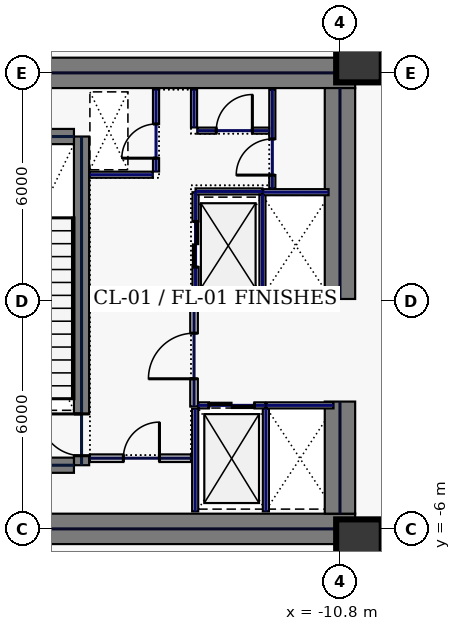
"""IFC4 building model, lengths in metres.
Left out: names, types, materials, properties, quantities, classifications, styles, units other than length and angle.
Written with IfcOpenShell. Run it as: python <this file> out.ifc"""

import sys

from ifc_helpers import new_model, si_unit, direction, frame, frame_2d, origin, origin_2d, place, context, subcontext, project, spatial, rectangle, hollow_rectangle, extrude, element, fill, save


model = new_model("IFC4")
c1 = context("Model", 3, precision=1e-05, world=origin(), true_north=direction((0.0, 1.0)))
c2 = subcontext(c1, "Body", "Model", "MODEL_VIEW")
j1 = project(units=[si_unit("LENGTHUNIT", "METRE"), si_unit("PLANEANGLEUNIT", "RADIAN")], contexts=[c1])
p1 = place(None, origin())
s1 = spatial("IfcSite", under=j1, at=p1, CompositionType="ELEMENT")
p2 = place(p1, origin())
s2 = spatial("IfcBuilding", under=s1, at=p2, CompositionType="ELEMENT")
p3 = place(p2, frame((0.0, 0.0, 28.4)))
s3 = spatial("IfcBuildingStorey", under=s2, at=p3, CompositionType="ELEMENT", Elevation=28.4)
for number, where, z_axis, x_axis in (
    (1, (-22.0, 6.0, 0.0), (0.0, 0.0, 1.0), (1.0, 0.0, 0.0)),
    (2, (-22.0, -6.0, 0.0), (0.0, 0.0, 1.0), (1.0, 0.0, 0.0)),
):
    element("IfcWall", number, at=place(p3, frame(where, z_axis=z_axis, x_axis=x_axis)), inside=s3, PredefinedType="SHEAR", context=c2, shape_type="SweptSolid", body=[
        extrude(rectangle(XDim=11.6, YDim=0.8, at=frame_2d((5.8, 0.0))), origin(), (0.0, 0.0, 1.0), 4.68),
    ])
p4 = place(p3, frame((-10.8, -5.6, 0.0), z_axis=(0.0, 0.0, 1.0), x_axis=(0.0, 1.0, 0.0)))
e3 = element("IfcWall", 3, at=p4, inside=s3, PredefinedType="SHEAR", context=c2, shape_type="SweptSolid", body=[
    extrude(rectangle(XDim=2.95, YDim=0.8, at=frame_2d((1.475, 0.0))), origin(), (0.0, 0.0, 1.0), 4.68),
])
p5 = place(p3, frame((-10.8, 0.05, 0.0), z_axis=(0.0, 0.0, 1.0), x_axis=(0.0, 1.0, 0.0)))
e4 = element("IfcWall", 4, at=p5, inside=s3, PredefinedType="SHEAR", context=c2, shape_type="SweptSolid", body=[
    extrude(rectangle(XDim=5.55, YDim=0.8, at=frame_2d((2.775, 0.0))), origin(), (0.0, 0.0, 1.0), 4.68),
])
p6 = place(p3, frame((-17.6, -4.325, 0.0), z_axis=(0.0, 0.0, 1.0), x_axis=(0.0, 1.0, 0.0)))
e5 = element("IfcWall", 5, at=p6, inside=s3, PredefinedType="SHEAR", context=c2, shape_type="SweptSolid", body=[
    extrude(rectangle(XDim=8.65, YDim=0.4, at=frame_2d((4.325, 0.0))), origin(), (0.0, 0.0, 1.0), 4.68),
])
p7 = place(p6, frame((0.25, 0.0, 0.0)))
e6 = element("IfcOpeningElement", 6, at=p7, cuts=e5, PredefinedType="OPENING", context=c2, shape_type="SweptSolid", body=[
    extrude(rectangle(XDim=1.1, YDim=2.2, at=frame_2d((0.55, 1.1))), frame((0.0, 0.21, 0.0), z_axis=(0.0, -1.0, 0.0), x_axis=(1.0, 0.0, 0.0)), (0.0, 0.0, 1.0), 0.42),
])
for number, where, z_axis, x_axis in (
    (7, (-21.2, -4.325, 0.0), (0.0, 0.0, 1.0), (1.0, 0.0, 0.0)),
    (8, (-21.2, 4.325, 0.0), (0.0, 0.0, 1.0), (1.0, 0.0, 0.0)),
):
    element("IfcWall", number, at=place(p3, frame(where, z_axis=z_axis, x_axis=x_axis)), inside=s3, PredefinedType="SHEAR", context=c2, shape_type="SweptSolid", body=[
        extrude(rectangle(XDim=3.4, YDim=0.4, at=frame_2d((1.7, 0.0))), origin(), (0.0, 0.0, 1.0), 4.68),
    ])
for number, where, z_axis, x_axis in (
    (9, (-10.3, -6.35, 0.0), (0.0, 0.0, 1.0), (1.0, 0.0, 0.0)),
    (10, (-10.3, 6.35, 0.0), (0.0, 0.0, 1.0), (1.0, 0.0, 0.0)),
):
    element("IfcColumn", number, at=place(p3, frame(where, z_axis=z_axis, x_axis=x_axis)), inside=s3, PredefinedType="COLUMN", context=c2, shape_type="SweptSolid", body=[
        extrude(hollow_rectangle(XDim=1.2, YDim=1.2, WallThickness=0.05, at=origin_2d()), origin(), (0.0, 0.0, 1.0), 4.68),
    ])
p8 = place(p3, frame((-14.6, 0.12, 0.0), z_axis=(0.0, 0.0, 1.0), x_axis=(0.0, 1.0, 0.0)))
e11 = element("IfcWall", 11, at=p8, inside=s3, PredefinedType="PARTITIONING", context=c2, shape_type="SweptSolid", body=[
    extrude(rectangle(XDim=2.74, YDim=0.16, at=frame_2d((1.37, 0.0))), origin(), (0.0, 0.0, 1.0), 4.68),
])
p9 = place(p8, frame((0.77, 0.0, 0.0)))
e12 = element("IfcOpeningElement", 12, at=p9, cuts=e11, PredefinedType="OPENING", context=c2, shape_type="SweptSolid", body=[
    extrude(rectangle(XDim=1.2, YDim=2.2, at=frame_2d((0.6, 1.1))), frame((0.0, 0.09, 0.0), z_axis=(0.0, -1.0, 0.0), x_axis=(1.0, 0.0, 0.0)), (0.0, 0.0, 1.0), 0.18),
])
for number, where, z_axis, x_axis in (
    (13, (-14.6, 0.1, 0.0), (0.0, 0.0, 1.0), (1.0, 0.0, 0.0)),
    (14, (-14.6, 2.88, 0.0), (0.0, 0.0, 1.0), (1.0, 0.0, 0.0)),
):
    element("IfcWall", number, at=place(p3, frame(where, z_axis=z_axis, x_axis=x_axis)), inside=s3, PredefinedType="PARTITIONING", context=c2, shape_type="SweptSolid", body=[
        extrude(rectangle(XDim=1.76, YDim=0.16, at=frame_2d((0.88, 0.0))), origin(), (0.0, 0.0, 1.0), 4.68),
    ])
p10 = place(p3, frame((-12.84, 0.18, 0.0), z_axis=(0.0, 0.0, 1.0), x_axis=(0.0, 1.0, 0.0)))
e15 = element("IfcWall", 15, at=p10, inside=s3, PredefinedType="PARTITIONING", context=c2, shape_type="SweptSolid", body=[
    extrude(rectangle(XDim=2.62, YDim=0.16, at=frame_2d((1.31, 0.0))), origin(), (0.0, 0.0, 1.0), 4.68),
])
p11 = place(p3, frame((-14.53, -2.75, 0.0), z_axis=(0.0, 0.0, 1.0), x_axis=(1.0, 0.0, 0.0)))
e16 = element("IfcWall", 16, at=p11, inside=s3, PredefinedType="PARTITIONING", context=c2, shape_type="SweptSolid", body=[
    extrude(rectangle(XDim=1.76, YDim=0.16, at=frame_2d((0.88, 0.0))), origin(), (0.0, 0.0, 1.0), 4.68),
])
p12 = place(p11, frame((0.28, 0.0, 0.0)))
e17 = element("IfcOpeningElement", 17, at=p12, cuts=e16, PredefinedType="OPENING", context=c2, shape_type="SweptSolid", body=[
    extrude(rectangle(XDim=1.2, YDim=2.2, at=frame_2d((0.6, 1.1))), frame((0.0, 0.09, 0.0), z_axis=(0.0, -1.0, 0.0), x_axis=(1.0, 0.0, 0.0)), (0.0, 0.0, 1.0), 0.18),
])
for number, where, z_axis, x_axis in (
    (18, (-12.75, -5.54, 0.0), (0.0, 0.0, 1.0), (0.0, 1.0, 0.0)),
    (19, (-14.61, -5.54, 0.0), (0.0, 0.0, 1.0), (0.0, 1.0, 0.0)),
):
    element("IfcWall", number, at=place(p3, frame(where, z_axis=z_axis, x_axis=x_axis)), inside=s3, PredefinedType="PARTITIONING", context=c2, shape_type="SweptSolid", body=[
        extrude(rectangle(XDim=2.7, YDim=0.16, at=frame_2d((1.35, 0.0))), origin(), (0.0, 0.0, 1.0), 4.68),
    ])
p13 = place(p3, frame((-12.73, -2.75, 0.0), z_axis=(0.0, 0.0, 1.0), x_axis=(1.0, 0.0, 0.0)))
e20 = element("IfcWall", 20, at=p13, inside=s3, PredefinedType="PARTITIONING", context=c2, shape_type="SweptSolid", body=[
    extrude(rectangle(XDim=1.76, YDim=0.16, at=frame_2d((0.88, 0.0))), origin(), (0.0, 0.0, 1.0), 4.68),
])
for number, where, z_axis, x_axis in (
    (21, (-12.82, 0.06, 0.0), (0.0, 0.0, 1.0), (1.0, 0.0, 0.0)),
    (22, (-12.82, 2.86, 0.0), (0.0, 0.0, 1.0), (1.0, 0.0, 0.0)),
):
    element("IfcWall", number, at=place(p3, frame(where, z_axis=z_axis, x_axis=x_axis)), inside=s3, PredefinedType="PARTITIONING", context=c2, shape_type="SweptSolid", body=[
        extrude(rectangle(XDim=1.72, YDim=0.16, at=frame_2d((0.86, 0.0))), origin(), (0.0, 0.0, 1.0), 4.68),
    ])
p14 = place(p3, frame((-15.64, 3.405, 0.0), z_axis=(0.0, 0.0, 1.0), x_axis=(0.0, 1.0, 0.0)))
e23 = element("IfcWall", 23, at=p14, inside=s3, PredefinedType="PARTITIONING", context=c2, shape_type="SweptSolid", body=[
    extrude(rectangle(XDim=2.155, YDim=0.16, at=frame_2d((1.078, 0.0))), origin(), (0.0, 0.0, 1.0), 4.68),
])
p15 = place(p14, frame((0.35, 0.0, 0.0)))
e24 = element("IfcOpeningElement", 24, at=p15, cuts=e23, PredefinedType="OPENING", context=c2, shape_type="SweptSolid", body=[
    extrude(rectangle(XDim=0.9, YDim=2.2, at=frame_2d((0.45, 1.1))), frame((0.0, 0.09, 0.0), z_axis=(0.0, -1.0, 0.0), x_axis=(1.0, 0.0, 0.0)), (0.0, 0.0, 1.0), 0.18),
])
p16 = place(p3, frame((-17.38, 3.32, 0.0), z_axis=(0.0, 0.0, 1.0), x_axis=(1.0, 0.0, 0.0)))
e25 = element("IfcWall", 25, at=p16, inside=s3, PredefinedType="PARTITIONING", context=c2, shape_type="SweptSolid", body=[
    extrude(rectangle(XDim=1.655, YDim=0.16, at=frame_2d((0.827, 0.0))), origin(), (0.0, 0.0, 1.0), 4.68),
])
p17 = place(p3, frame((-17.38, -4.14, 0.0), z_axis=(0.0, 0.0, 1.0), x_axis=(1.0, 0.0, 0.0)))
e26 = element("IfcWall", 26, at=p17, inside=s3, PredefinedType="SOLIDWALL", context=c2, shape_type="SweptSolid", body=[
    extrude(rectangle(XDim=2.66, YDim=0.2, at=frame_2d((1.33, 0.0))), origin(), (0.0, 0.0, 1.0), 4.68),
])
p18 = place(p17, frame((0.88, 0.0, 0.0)))
e27 = element("IfcOpeningElement", 27, at=p18, cuts=e26, PredefinedType="OPENING", context=c2, shape_type="SweptSolid", body=[
    extrude(rectangle(XDim=0.95, YDim=2.2, at=frame_2d((0.475, 1.1))), frame((0.0, 0.11, 0.0), z_axis=(0.0, -1.0, 0.0), x_axis=(1.0, 0.0, 0.0)), (0.0, 0.0, 1.0), 0.22),
])
p19 = place(p3, frame((-12.58, 2.96, 0.0), z_axis=(0.0, 0.0, 1.0), x_axis=(0.0, 1.0, 0.0)))
e28 = element("IfcWall", 28, at=p19, inside=s3, PredefinedType="PARTITIONING", context=c2, shape_type="SweptSolid", body=[
    extrude(rectangle(XDim=2.6, YDim=0.16, at=frame_2d((1.3, 0.0))), origin(), (0.0, 0.0, 1.0), 4.68),
])
p20 = place(p19, frame((0.35, 0.0, 0.0)))
e29 = element("IfcOpeningElement", 29, at=p20, cuts=e28, PredefinedType="OPENING", context=c2, shape_type="SweptSolid", body=[
    extrude(rectangle(XDim=0.95, YDim=2.2, at=frame_2d((0.475, 1.1))), frame((0.0, 0.09, 0.0), z_axis=(0.0, -1.0, 0.0), x_axis=(1.0, 0.0, 0.0)), (0.0, 0.0, 1.0), 0.18),
])
p21 = place(p3, frame((-14.555, 4.48, 0.0), z_axis=(0.0, 0.0, 1.0), x_axis=(1.0, 0.0, 0.0)))
e30 = element("IfcWall", 30, at=p21, inside=s3, PredefinedType="PARTITIONING", context=c2, shape_type="SweptSolid", body=[
    extrude(rectangle(XDim=1.89, YDim=0.16, at=frame_2d((0.945, 0.0))), origin(), (0.0, 0.0, 1.0), 4.68),
])
p22 = place(p21, frame((0.5, 0.0, 0.0)))
e31 = element("IfcOpeningElement", 31, at=p22, cuts=e30, PredefinedType="OPENING", context=c2, shape_type="SweptSolid", body=[
    extrude(rectangle(XDim=0.95, YDim=2.2, at=frame_2d((0.475, 1.1))), frame((0.0, 0.09, 0.0), z_axis=(0.0, -1.0, 0.0), x_axis=(1.0, 0.0, 0.0)), (0.0, 0.0, 1.0), 0.18),
])
p23 = place(p3, frame((-14.64, 4.565, 0.0), z_axis=(0.0, 0.0, 1.0), x_axis=(0.0, 1.0, 0.0)))
e32 = element("IfcWall", 32, at=p23, inside=s3, PredefinedType="PARTITIONING", context=c2, shape_type="SweptSolid", body=[
    extrude(rectangle(XDim=0.995, YDim=0.16, at=frame_2d((0.498, 0.0))), origin(), (0.0, 0.0, 1.0), 4.68),
])
p24 = place(p3, frame((-14.64, -2.78, 0.0), z_axis=(0.0, 0.0, 1.0), x_axis=(0.0, 1.0, 0.0)))
e33 = element("IfcWall", 33, at=p24, inside=s3, PredefinedType="SOLIDWALL", context=c2, shape_type="SweptSolid", body=[
    extrude(rectangle(XDim=2.82, YDim=0.2, at=frame_2d((1.41, 0.0))), origin(), (0.0, 0.0, 1.0), 4.68),
])
p25 = place(p24, frame((0.73, 0.0, 0.0)))
e34 = element("IfcOpeningElement", 34, at=p25, cuts=e33, PredefinedType="OPENING", context=c2, shape_type="SweptSolid", body=[
    extrude(rectangle(XDim=1.2, YDim=2.2, at=frame_2d((0.6, 1.1))), frame((0.0, 0.11, 0.0), z_axis=(0.0, -1.0, 0.0), x_axis=(1.0, 0.0, 0.0)), (0.0, 0.0, 1.0), 0.22),
])
for number, where, z_axis, x_axis in (
    (35, (-10.58, -7.485, 0.0), (0.0, 0.0, 1.0), (0.0, 1.0, 0.0)),
    (36, (-10.58, 6.42, 0.0), (0.0, 0.0, 1.0), (0.0, 1.0, 0.0)),
):
    element("IfcWall", number, at=place(p3, frame(where, z_axis=z_axis, x_axis=x_axis)), inside=s3, PredefinedType="PARTITIONING", context=c2, shape_type="SweptSolid", body=[
        extrude(rectangle(XDim=1.065, YDim=0.16, at=frame_2d((0.533, 0.0))), origin(), (0.0, 0.0, 1.0), 4.68),
    ])
p26 = place(p7, origin())
e37 = element("IfcDoor", 37, at=p26, inside=s3, OperationType="SINGLE_SWING_RIGHT", PredefinedType="DOOR", context=c2, shape_type="SweptSolid", body=[
    extrude(rectangle(XDim=1.1, YDim=2.2, at=frame_2d((0.55, 1.1))), frame((0.0, 0.025, 0.0), z_axis=(0.0, -1.0, 0.0), x_axis=(1.0, 0.0, 0.0)), (0.0, 0.0, 1.0), 0.05),
])
fill(e6, e37)
p27 = place(p9, origin())
e38 = element("IfcDoor", 38, at=p27, inside=s3, OperationType="SLIDING_TO_LEFT", PredefinedType="DOOR", context=c2, shape_type="SweptSolid", body=[
    extrude(rectangle(XDim=1.2, YDim=2.2, at=frame_2d((0.6, 1.1))), frame((0.0, 0.025, 0.0), z_axis=(0.0, -1.0, 0.0), x_axis=(1.0, 0.0, 0.0)), (0.0, 0.0, 1.0), 0.05),
])
fill(e12, e38)
p28 = place(p12, origin())
e39 = element("IfcDoor", 39, at=p28, inside=s3, OperationType="SLIDING_TO_LEFT", PredefinedType="DOOR", context=c2, shape_type="SweptSolid", body=[
    extrude(rectangle(XDim=1.2, YDim=2.2, at=frame_2d((0.6, 1.1))), frame((0.0, 0.025, 0.0), z_axis=(0.0, -1.0, 0.0), x_axis=(1.0, 0.0, 0.0)), (0.0, 0.0, 1.0), 0.05),
])
fill(e17, e39)
p29 = place(p15, origin())
e40 = element("IfcDoor", 40, at=p29, inside=s3, OperationType="SINGLE_SWING_LEFT", PredefinedType="DOOR", context=c2, shape_type="SweptSolid", body=[
    extrude(rectangle(XDim=0.9, YDim=2.2, at=frame_2d((0.45, 1.1))), frame((0.0, 0.025, 0.0), z_axis=(0.0, -1.0, 0.0), x_axis=(1.0, 0.0, 0.0)), (0.0, 0.0, 1.0), 0.05),
])
fill(e24, e40)
p30 = place(p18, origin())
e41 = element("IfcDoor", 41, at=p30, inside=s3, OperationType="SINGLE_SWING_RIGHT", PredefinedType="DOOR", context=c2, shape_type="SweptSolid", body=[
    extrude(rectangle(XDim=0.95, YDim=2.2, at=frame_2d((0.475, 1.1))), frame((0.0, 0.025, 0.0), z_axis=(0.0, -1.0, 0.0), x_axis=(1.0, 0.0, 0.0)), (0.0, 0.0, 1.0), 0.05),
])
fill(e27, e41)
p31 = place(p20, origin())
e42 = element("IfcDoor", 42, at=p31, inside=s3, OperationType="SINGLE_SWING_LEFT", PredefinedType="DOOR", context=c2, shape_type="SweptSolid", body=[
    extrude(rectangle(XDim=0.95, YDim=2.2, at=frame_2d((0.475, 1.1))), frame((0.0, 0.025, 0.0), z_axis=(0.0, -1.0, 0.0), x_axis=(1.0, 0.0, 0.0)), (0.0, 0.0, 1.0), 0.05),
])
fill(e29, e42)
p32 = place(p22, origin())
e43 = element("IfcDoor", 43, at=p32, inside=s3, OperationType="SINGLE_SWING_RIGHT", PredefinedType="DOOR", context=c2, shape_type="SweptSolid", body=[
    extrude(rectangle(XDim=0.95, YDim=2.2, at=frame_2d((0.475, 1.1))), frame((0.0, 0.025, 0.0), z_axis=(0.0, -1.0, 0.0), x_axis=(1.0, 0.0, 0.0)), (0.0, 0.0, 1.0), 0.05),
])
fill(e31, e43)
p33 = place(p25, origin())
e44 = element("IfcDoor", 44, at=p33, inside=s3, OperationType="SINGLE_SWING_LEFT", PredefinedType="DOOR", context=c2, shape_type="SweptSolid", body=[
    extrude(rectangle(XDim=1.2, YDim=2.2, at=frame_2d((0.6, 1.1))), frame((0.0, 0.025, 0.0), z_axis=(0.0, -1.0, 0.0), x_axis=(1.0, 0.0, 0.0)), (0.0, 0.0, 1.0), 0.05),
])
fill(e34, e44)
save(model, sys.argv[1])
